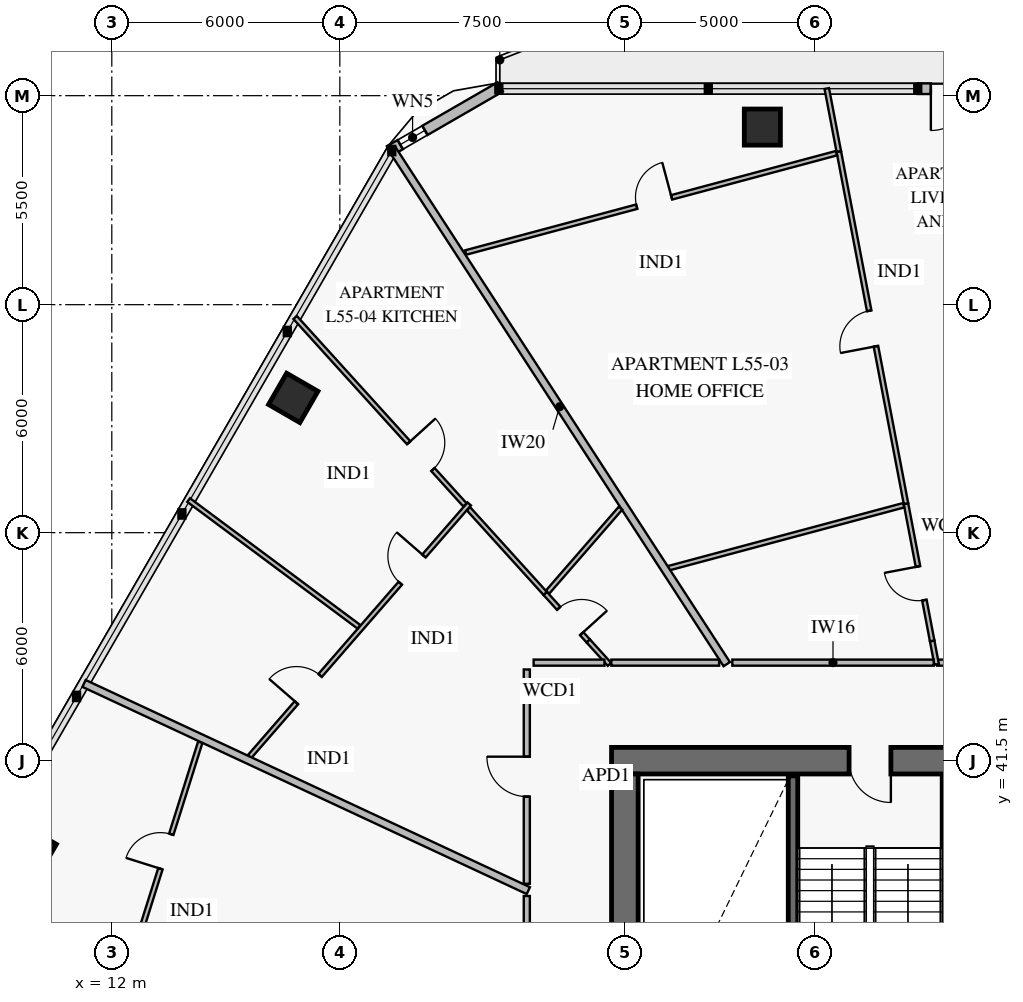
"""IFC4 building model, lengths in metres.
Left out: names, types, materials, properties, quantities, classifications, styles, units other than length and angle.
Written with IfcOpenShell. Run it as: python <this file> out.ifc"""

import sys

from ifc_helpers import new_model, si_unit, direction, frame, frame_2d, origin, origin_2d, place, context, subcontext, project, spatial, rectangle, extrude, element, fill, save


model = new_model("IFC4")
c1 = context("Model", 3, precision=1e-05, world=origin(), true_north=direction((0.0, 1.0)))
c2 = subcontext(c1, "Body", "Model", "MODEL_VIEW")
j1 = project(units=[si_unit("LENGTHUNIT", "METRE"), si_unit("PLANEANGLEUNIT", "RADIAN")], contexts=[c1])
p1 = place(None, origin())
s1 = spatial("IfcSite", under=j1, at=p1, CompositionType="ELEMENT")
p2 = place(p1, origin())
s2 = spatial("IfcBuilding", under=s1, at=p2, CompositionType="ELEMENT")
p3 = place(p2, frame((0.0, 0.0, 218.8)))
s3 = spatial("IfcBuildingStorey", under=s2, at=p3, CompositionType="ELEMENT", Elevation=218.8)
p4 = place(p3, frame((36.75, 41.5, 0.0), z_axis=(0.0, 0.0, 1.0), x_axis=(-1.0, 0.0, 0.0)))
e1 = element("IfcWall", 1, at=p4, inside=s3, PredefinedType="SHEAR", context=c2, shape_type="SweptSolid", body=[
    extrude(rectangle(XDim=11.6, YDim=0.7, at=frame_2d((5.8, 0.0))), origin(), (0.0, 0.0, 1.0), 3.8),
])
p5 = place(p4, frame((4.25, 0.0, 0.0)))
e2 = element("IfcOpeningElement", 2, at=p5, cuts=e1, PredefinedType="OPENING", context=c2, shape_type="SweptSolid", body=[
    extrude(rectangle(XDim=1.1, YDim=2.15, at=frame_2d((0.55, 1.075))), frame((0.0, 0.362, 0.0), z_axis=(0.0, -1.0, 0.0), x_axis=(1.0, 0.0, 0.0)), (0.0, 0.0, 1.0), 0.724),
])
p6 = place(p3, frame((25.5, 22.85, 0.0), z_axis=(0.0, 0.0, 1.0), x_axis=(0.0, 1.0, 0.0)))
e3 = element("IfcWall", 3, at=p6, inside=s3, PredefinedType="SHEAR", context=c2, shape_type="SweptSolid", body=[
    extrude(rectangle(XDim=18.3, YDim=0.7, at=frame_2d((9.15, 0.0))), origin(), (0.0, 0.0, 1.0), 3.8),
])
p7 = place(p6, frame((8.9, 0.0, 0.0)))
e4 = element("IfcOpeningElement", 4, at=p7, cuts=e3, PredefinedType="OPENING", context=c2, shape_type="SweptSolid", body=[
    extrude(rectangle(XDim=1.1, YDim=2.15, at=frame_2d((0.55, 1.075))), frame((0.0, 0.362, 0.0), z_axis=(0.0, -1.0, 0.0), x_axis=(1.0, 0.0, 0.0)), (0.0, 0.0, 1.0), 0.724),
])
for number, where, z_axis, x_axis in (
    (5, (29.118, 58.173, 0.0), (0.0, 0.0, 1.0), (-1.0, 0.0, 0.0)),
    (6, (16.774, 51.047, 0.0), (0.0, 0.0, 1.0), (-0.5, -0.866, 0.0)),
    (7, (9.892, 39.126, 0.0), (0.0, 0.0, 1.0), (-0.5, -0.866, 0.0)),
):
    element("IfcColumn", number, at=place(p3, frame(where, z_axis=z_axis, x_axis=x_axis)), inside=s3, PredefinedType="COLUMN", context=c2, shape_type="SweptSolid", body=[
        extrude(rectangle(XDim=0.95, YDim=0.95, at=origin_2d()), origin(), (0.0, 0.0, 1.0), 3.55),
    ])
p8 = place(p3, frame((19.307, 57.548, 0.0), z_axis=(0.0, 0.0, 1.0), x_axis=(0.866020068361, 0.500009241111, 0.0)))
e8 = element("IfcWall", 8, at=p8, inside=s3, PredefinedType="SOLIDWALL", context=c2, shape_type="SweptSolid", body=[
    extrude(rectangle(XDim=3.365, YDim=0.28, at=frame_2d((1.683, 0.0))), origin(), (0.0, 0.0, 1.0), 3.55),
])
p9 = place(p8, frame((0.326, 0.0, 0.85)))
e9 = element("IfcOpeningElement", 9, at=p9, cuts=e8, PredefinedType="OPENING", context=c2, shape_type="SweptSolid", body=[
    extrude(rectangle(XDim=0.75, YDim=1.5, at=frame_2d((0.375, 0.75))), frame((0.0, 0.152, 0.0), z_axis=(0.0, -1.0, 0.0), x_axis=(1.0, 0.0, 0.0)), (0.0, 0.0, 1.0), 0.304),
])
p10 = place(p3, frame((33.207, 59.183, 0.0), z_axis=(0.0, 0.0, 1.0), x_axis=(1.0, 0.0, 0.0)))
e10 = element("IfcWall", 10, at=p10, inside=s3, PredefinedType="SOLIDWALL", context=c2, shape_type="SweptSolid", body=[
    extrude(rectangle(XDim=1.79, YDim=0.28, at=frame_2d((0.895, 0.0))), origin(), (0.0, 0.0, 1.0), 3.55),
])
p11 = place(p10, frame((0.345, 0.0, 0.0)))
e11 = element("IfcOpeningElement", 11, at=p11, cuts=e10, PredefinedType="OPENING", context=c2, shape_type="SweptSolid", body=[
    extrude(rectangle(XDim=1.1, YDim=2.2, at=frame_2d((0.55, 1.1))), frame((0.0, 0.152, 0.0), z_axis=(0.0, -1.0, 0.0), x_axis=(1.0, 0.0, 0.0)), (0.0, 0.0, 1.0), 0.304),
])
for number, where, z_axis, x_axis in (
    (12, (29.925, 31.4, 0.0), (0.0, 0.0, 1.0), (0.0, 1.0, 0.0)),
    (13, (33.975, 31.4, 0.0), (0.0, 0.0, 1.0), (0.0, 1.0, 0.0)),
):
    element("IfcWall", number, at=place(p3, frame(where, z_axis=z_axis, x_axis=x_axis)), inside=s3, PredefinedType="SOLIDWALL", context=c2, shape_type="SweptSolid", body=[
        extrude(rectangle(XDim=9.7, YDim=0.25, at=frame_2d((4.85, 0.0))), origin(), (0.0, 0.0, 1.0), 3.8),
    ])
p12 = place(p3, frame((33.587, 44.65, 0.0), z_axis=(0.0, 0.0, 1.0), x_axis=(-0.187380416109, 0.982287422122, 0.0)))
e14 = element("IfcWall", 14, at=p12, inside=s3, PredefinedType="PARTITIONING", context=c2, shape_type="SweptSolid", body=[
    extrude(rectangle(XDim=3.679, YDim=0.12, at=frame_2d((1.84, 0.0))), origin(), (0.0, 0.0, 1.0), 3.55),
])
p13 = place(p12, frame((1.095, 0.0, 0.0)))
e15 = element("IfcOpeningElement", 15, at=p13, cuts=e14, PredefinedType="OPENING", context=c2, shape_type="SweptSolid", body=[
    extrude(rectangle(XDim=0.9, YDim=2.1, at=frame_2d((0.45, 1.05))), frame((0.0, 0.072, 0.0), z_axis=(0.0, -1.0, 0.0), x_axis=(1.0, 0.0, 0.0)), (0.0, 0.0, 1.0), 0.144),
])
p14 = place(p3, frame((32.897, 48.264, 0.0), z_axis=(0.0, 0.0, 1.0), x_axis=(-0.187382109983, 0.982287098998, 0.0)))
e16 = element("IfcWall", 16, at=p14, inside=s3, PredefinedType="PARTITIONING", context=c2, shape_type="SweptSolid", body=[
    extrude(rectangle(XDim=9.432, YDim=0.12, at=frame_2d((4.716, 0.0))), origin(), (0.0, 0.0, 1.0), 3.15),
])
p15 = place(p14, frame((4.216, 0.0, 0.0)))
e17 = element("IfcOpeningElement", 17, at=p15, cuts=e16, PredefinedType="OPENING", context=c2, shape_type="SweptSolid", body=[
    extrude(rectangle(XDim=0.95, YDim=2.1, at=frame_2d((0.475, 1.05))), frame((0.0, 0.072, 0.0), z_axis=(0.0, -1.0, 0.0), x_axis=(1.0, 0.0, 0.0)), (0.0, 0.0, 1.0), 0.144),
])
p16 = place(p3, frame((31.069, 57.487, 0.0), z_axis=(0.0, 0.0, 1.0), x_axis=(-0.965920975917, -0.258837146257, 0.0)))
e18 = element("IfcWall", 18, at=p16, inside=s3, PredefinedType="PARTITIONING", context=c2, shape_type="SweptSolid", body=[
    extrude(rectangle(XDim=10.103, YDim=0.12, at=frame_2d((5.051, 0.0))), origin(), (0.0, 0.0, 1.0), 2.87),
])
p17 = place(p16, frame((4.492, 0.0, 0.0)))
e19 = element("IfcOpeningElement", 19, at=p17, cuts=e18, PredefinedType="OPENING", context=c2, shape_type="SweptSolid", body=[
    extrude(rectangle(XDim=0.95, YDim=2.1, at=frame_2d((0.475, 1.05))), frame((0.0, 0.072, 0.0), z_axis=(0.0, -1.0, 0.0), x_axis=(1.0, 0.0, 0.0)), (0.0, 0.0, 1.0), 0.144),
])
p18 = place(p3, frame((36.507, 44.08, 0.0), z_axis=(0.0, 0.0, 1.0), x_axis=(-1.0, 0.0, 0.0)))
e20 = element("IfcWall", 20, at=p18, inside=s3, PredefinedType="PARTITIONING", context=c2, shape_type="SweptSolid", body=[
    extrude(rectangle(XDim=2.791, YDim=0.16, at=frame_2d((1.396, 0.0))), origin(), (0.0, 0.0, 1.0), 3.55),
])
p19 = place(p18, frame((0.871, 0.0, 0.0)))
e21 = element("IfcOpeningElement", 21, at=p19, cuts=e20, PredefinedType="OPENING", context=c2, shape_type="SweptSolid", body=[
    extrude(rectangle(XDim=1.05, YDim=2.15, at=frame_2d((0.525, 1.075))), frame((0.0, 0.092, 0.0), z_axis=(0.0, -1.0, 0.0), x_axis=(1.0, 0.0, 0.0)), (0.0, 0.0, 1.0), 0.184),
])
p20 = place(p3, frame((21.405, 48.256, 0.0), z_axis=(0.0, 0.0, 1.0), x_axis=(-0.656056582119, -0.754711707249, 0.0)))
e22 = element("IfcWall", 22, at=p20, inside=s3, PredefinedType="PARTITIONING", context=c2, shape_type="SweptSolid", body=[
    extrude(rectangle(XDim=8.81, YDim=0.12, at=frame_2d((4.405, 0.0))), origin(), (0.0, 0.0, 1.0), 2.9),
])
p21 = place(p20, frame((1.815, 0.0, 0.0)))
e23 = element("IfcOpeningElement", 23, at=p21, cuts=e22, PredefinedType="OPENING", context=c2, shape_type="SweptSolid", body=[
    extrude(rectangle(XDim=0.95, YDim=2.1, at=frame_2d((0.475, 1.05))), frame((0.0, 0.072, 0.0), z_axis=(0.0, -1.0, 0.0), x_axis=(1.0, 0.0, 0.0)), (0.0, 0.0, 1.0), 0.144),
])
p22 = place(p20, frame((5.979, 0.0, 0.0)))
e24 = element("IfcOpeningElement", 24, at=p22, cuts=e22, PredefinedType="OPENING", context=c2, shape_type="SweptSolid", body=[
    extrude(rectangle(XDim=0.95, YDim=2.1, at=frame_2d((0.475, 1.05))), frame((0.0, 0.072, 0.0), z_axis=(0.0, -1.0, 0.0), x_axis=(1.0, 0.0, 0.0)), (0.0, 0.0, 1.0), 0.144),
])
p23 = place(p3, frame((24.538, 44.65, 0.0), z_axis=(0.0, 0.0, 1.0), x_axis=(-0.671412772052, 0.741083591456, 0.0)))
e25 = element("IfcWall", 25, at=p23, inside=s3, PredefinedType="PARTITIONING", context=c2, shape_type="SweptSolid", body=[
    extrude(rectangle(XDim=1.689, YDim=0.12, at=frame_2d((0.844, 0.0))), origin(), (0.0, 0.0, 1.0), 3.55),
])
p24 = place(p23, frame((0.26, 0.0, 0.0)))
e26 = element("IfcOpeningElement", 26, at=p24, cuts=e25, PredefinedType="OPENING", context=c2, shape_type="SweptSolid", body=[
    extrude(rectangle(XDim=0.9, YDim=2.1, at=frame_2d((0.45, 1.05))), frame((0.0, 0.072, 0.0), z_axis=(0.0, -1.0, 0.0), x_axis=(1.0, 0.0, 0.0)), (0.0, 0.0, 1.0), 0.144),
])
p25 = place(p3, frame((23.404, 45.902, 0.0), z_axis=(0.0, 0.0, 1.0), x_axis=(-0.671451143828, 0.741048825282, 0.0)))
e27 = element("IfcWall", 27, at=p25, inside=s3, PredefinedType="PARTITIONING", context=c2, shape_type="SweptSolid", body=[
    extrude(rectangle(XDim=3.006, YDim=0.12, at=frame_2d((1.503, 0.0))), origin(), (0.0, 0.0, 1.0), 3.55),
])
p26 = place(p3, frame((21.293, 48.231, 0.0), z_axis=(0.0, 0.0, 1.0), x_axis=(-0.671455850546, 0.741044560581, 0.0)))
e28 = element("IfcWall", 28, at=p26, inside=s3, PredefinedType="PARTITIONING", context=c2, shape_type="SweptSolid", body=[
    extrude(rectangle(XDim=6.655, YDim=0.12, at=frame_2d((3.328, 0.0))), origin(), (0.0, 0.0, 1.0), 2.87),
])
p27 = place(p26, frame((1.256, 0.0, 0.0)))
e29 = element("IfcOpeningElement", 29, at=p27, cuts=e28, PredefinedType="OPENING", context=c2, shape_type="SweptSolid", body=[
    extrude(rectangle(XDim=0.95, YDim=2.1, at=frame_2d((0.475, 1.05))), frame((0.0, 0.072, 0.0), z_axis=(0.0, -1.0, 0.0), x_axis=(1.0, 0.0, 0.0)), (0.0, 0.0, 1.0), 0.144),
])
p28 = place(p3, frame((22.92, 43.9, 0.0), z_axis=(0.0, 0.0, 1.0), x_axis=(0.0, -1.0, 0.0)))
e30 = element("IfcWall", 30, at=p28, inside=s3, PredefinedType="PARTITIONING", context=c2, shape_type="SweptSolid", body=[
    extrude(rectangle(XDim=5.639, YDim=0.16, at=frame_2d((2.819, 0.0))), origin(), (0.0, 0.0, 1.0), 3.55),
])
p29 = place(p28, frame((2.294, 0.0, 0.0)))
e31 = element("IfcOpeningElement", 31, at=p29, cuts=e30, PredefinedType="OPENING", context=c2, shape_type="SweptSolid", body=[
    extrude(rectangle(XDim=1.05, YDim=2.15, at=frame_2d((0.525, 1.075))), frame((0.0, 0.092, 0.0), z_axis=(0.0, -1.0, 0.0), x_axis=(1.0, 0.0, 0.0)), (0.0, 0.0, 1.0), 0.184),
])
p30 = place(p3, frame((14.328, 41.986, 0.0), z_axis=(0.0, 0.0, 1.0), x_axis=(-0.300371813261, -0.95382219192, 0.0)))
e32 = element("IfcWall", 32, at=p30, inside=s3, PredefinedType="PARTITIONING", context=c2, shape_type="SweptSolid", body=[
    extrude(rectangle(XDim=6.031, YDim=0.12, at=frame_2d((3.016, 0.0))), origin(), (0.0, 0.0, 1.0), 2.9),
])
p31 = place(p30, frame((2.541, 0.0, 0.0)))
e33 = element("IfcOpeningElement", 33, at=p31, cuts=e32, PredefinedType="OPENING", context=c2, shape_type="SweptSolid", body=[
    extrude(rectangle(XDim=0.95, YDim=2.1, at=frame_2d((0.475, 1.05))), frame((0.0, 0.072, 0.0), z_axis=(0.0, -1.0, 0.0), x_axis=(1.0, 0.0, 0.0)), (0.0, 0.0, 1.0), 0.144),
])
p32 = place(p3, frame((22.92, 37.939, 0.0), z_axis=(0.0, 0.0, 1.0), x_axis=(0.0, -1.0, 0.0)))
e34 = element("IfcWall", 34, at=p32, inside=s3, PredefinedType="PARTITIONING", context=c2, shape_type="SweptSolid", body=[
    extrude(rectangle(XDim=3.504, YDim=0.16, at=frame_2d((1.752, 0.0))), origin(), (0.0, 0.0, 1.0), 2.9),
])
p33 = place(p32, frame((1.227, 0.0, 0.0)))
e35 = element("IfcOpeningElement", 35, at=p33, cuts=e34, PredefinedType="OPENING", context=c2, shape_type="SweptSolid", body=[
    extrude(rectangle(XDim=1.05, YDim=2.15, at=frame_2d((0.525, 1.075))), frame((0.0, 0.092, 0.0), z_axis=(0.0, -1.0, 0.0), x_axis=(1.0, 0.0, 0.0)), (0.0, 0.0, 1.0), 0.184),
])
p34 = place(p3, frame((33.704, 44.035, 0.0), z_axis=(0.0, 0.0, 1.0), x_axis=(-0.187327304351, 0.982297552193, 0.0)))
e36 = element("IfcWall", 36, at=p34, inside=s3, PredefinedType="PARTITIONING", context=c2, shape_type="SweptSolid", body=[
    extrude(rectangle(XDim=0.625, YDim=0.12, at=frame_2d((0.313, 0.0))), origin(), (0.0, 0.0, 1.0), 3.55),
])
p35 = place(p3, frame((31.13, 57.529, 0.0), z_axis=(0.0, 0.0, 1.0), x_axis=(-0.187324644642, 0.982298059404, 0.0)))
e37 = element("IfcWall", 37, at=p35, inside=s3, PredefinedType="PARTITIONING", context=c2, shape_type="SweptSolid", body=[
    extrude(rectangle(XDim=1.689, YDim=0.12, at=frame_2d((0.844, 0.0))), origin(), (0.0, 0.0, 1.0), 2.87),
])
p36 = place(p3, frame((32.836, 48.222, 0.0), z_axis=(0.0, 0.0, 1.0), x_axis=(-0.96593063868, -0.258801084347, 0.0)))
e38 = element("IfcWall", 38, at=p36, inside=s3, PredefinedType="PARTITIONING", context=c2, shape_type="SweptSolid", body=[
    extrude(rectangle(XDim=6.446, YDim=0.12, at=frame_2d((3.223, 0.0))), origin(), (0.0, 0.0, 1.0), 2.9),
])
p37 = place(p3, frame((28.181, 44.04, 0.0), z_axis=(0.0, 0.0, 1.0), x_axis=(-0.54463871909, 0.838670773109, 0.0)))
e39 = element("IfcWall", 39, at=p37, inside=s3, PredefinedType="PARTITIONING", context=c2, shape_type="SweptSolid", body=[
    extrude(rectangle(XDim=16.152, YDim=0.2, at=frame_2d((8.076, 0.0))), origin(), (0.0, 0.0, 1.0), 2.87),
])
p38 = place(p3, frame((18.504, 45.022, 0.0), z_axis=(0.0, 0.0, 1.0), x_axis=(-0.80220207226, 0.597052623528, 0.0)))
e40 = element("IfcWall", 40, at=p38, inside=s3, PredefinedType="PARTITIONING", context=c2, shape_type="SweptSolid", body=[
    extrude(rectangle(XDim=5.587, YDim=0.12, at=frame_2d((2.794, 0.0))), origin(), (0.0, 0.0, 1.0), 2.87),
])
p39 = place(p3, frame((25.095, 44.035, 0.0), z_axis=(0.0, 0.0, 1.0), x_axis=(-0.671544659746, 0.740964081428, 0.0)))
e41 = element("IfcWall", 41, at=p39, inside=s3, PredefinedType="PARTITIONING", context=c2, shape_type="SweptSolid", body=[
    extrude(rectangle(XDim=0.83, YDim=0.12, at=frame_2d((0.415, 0.0))), origin(), (0.0, 0.0, 1.0), 3.55),
])
p40 = place(p3, frame((25.387, 48.145, 0.0), z_axis=(0.0, 0.0, 1.0), x_axis=(-0.656075513179, -0.75469525042, 0.0)))
e42 = element("IfcWall", 42, at=p40, inside=s3, PredefinedType="PARTITIONING", context=c2, shape_type="SweptSolid", body=[
    extrude(rectangle(XDim=2.929, YDim=0.12, at=frame_2d((1.464, 0.0))), origin(), (0.0, 0.0, 1.0), 3.55),
])
p41 = place(p3, frame((22.96, 38.081, 0.0), z_axis=(0.0, 0.0, 1.0), x_axis=(-0.906312686975, 0.422607753629, 0.0)))
e43 = element("IfcWall", 43, at=p41, inside=s3, PredefinedType="PARTITIONING", context=c2, shape_type="SweptSolid", body=[
    extrude(rectangle(XDim=12.899, YDim=0.2, at=frame_2d((6.449, 0.0))), origin(), (0.0, 0.0, 1.0), 2.87),
])
p42 = place(p3, frame((12.479, 36.342, 0.0), z_axis=(0.0, 0.0, 1.0), x_axis=(-0.983384489308, 0.181534972355, 0.0)))
e44 = element("IfcWall", 44, at=p42, inside=s3, PredefinedType="PARTITIONING", context=c2, shape_type="SweptSolid", body=[
    extrude(rectangle(XDim=4.937, YDim=0.12, at=frame_2d((2.469, 0.0))), origin(), (0.0, 0.0, 1.0), 2.87),
])
p43 = place(p3, frame((33.626, 44.08, 0.0), z_axis=(0.0, 0.0, 1.0), x_axis=(-1.0, 0.0, 0.0)))
e45 = element("IfcWall", 45, at=p43, inside=s3, PredefinedType="PARTITIONING", context=c2, shape_type="SweptSolid", body=[
    extrude(rectangle(XDim=5.299, YDim=0.16, at=frame_2d((2.649, 0.0))), origin(), (0.0, 0.0, 1.0), 2.9),
])
p44 = place(p3, frame((24.962, 44.08, 0.0), z_axis=(0.0, 0.0, 1.0), x_axis=(-1.0, 0.0, 0.0)))
e46 = element("IfcWall", 46, at=p44, inside=s3, PredefinedType="PARTITIONING", context=c2, shape_type="SweptSolid", body=[
    extrude(rectangle(XDim=1.862, YDim=0.16, at=frame_2d((0.931, 0.0))), origin(), (0.0, 0.0, 1.0), 2.9),
])
p45 = place(p3, frame((27.98, 44.08, 0.0), z_axis=(0.0, 0.0, 1.0), x_axis=(-1.0, 0.0, 0.0)))
e47 = element("IfcWall", 47, at=p45, inside=s3, PredefinedType="PARTITIONING", context=c2, shape_type="SweptSolid", body=[
    extrude(rectangle(XDim=2.836, YDim=0.16, at=frame_2d((1.418, 0.0))), origin(), (0.0, 0.0, 1.0), 3.55),
])
p46 = place(p9, origin())
e48 = element("IfcWindow", 48, at=p46, inside=s3, PartitioningType="SINGLE_PANEL", PredefinedType="WINDOW", context=c2, shape_type="SweptSolid", body=[
    extrude(rectangle(XDim=0.75, YDim=1.5, at=frame_2d((0.375, 0.75))), frame((0.0, 0.03, 0.0), z_axis=(0.0, -1.0, 0.0), x_axis=(1.0, 0.0, 0.0)), (0.0, 0.0, 1.0), 0.06),
])
fill(e9, e48)
p47 = place(p11, frame((1.1, 0.0, 0.0), z_axis=(0.0, 0.0, 1.0), x_axis=(-1.0, 0.0, 0.0)))
e49 = element("IfcDoor", 49, at=p47, inside=s3, OperationType="SINGLE_SWING_RIGHT", PredefinedType="DOOR", context=c2, shape_type="SweptSolid", body=[
    extrude(rectangle(XDim=1.1, YDim=2.2, at=frame_2d((0.55, 1.1))), frame((0.0, 0.025, 0.0), z_axis=(0.0, -1.0, 0.0), x_axis=(1.0, 0.0, 0.0)), (0.0, 0.0, 1.0), 0.05),
])
fill(e11, e49)
p48 = place(p5, origin())
e50 = element("IfcDoor", 50, at=p48, inside=s3, OperationType="SINGLE_SWING_LEFT", PredefinedType="USERDEFINED", context=c2, shape_type="SweptSolid", body=[
    extrude(rectangle(XDim=1.1, YDim=2.15, at=frame_2d((0.55, 1.075))), frame((0.0, 0.025, 0.0), z_axis=(0.0, -1.0, 0.0), x_axis=(1.0, 0.0, 0.0)), (0.0, 0.0, 1.0), 0.05),
])
fill(e2, e50)
p49 = place(p13, origin())
e51 = element("IfcDoor", 51, at=p49, inside=s3, OperationType="SINGLE_SWING_RIGHT", PredefinedType="DOOR", context=c2, shape_type="SweptSolid", body=[
    extrude(rectangle(XDim=0.9, YDim=2.1, at=frame_2d((0.45, 1.05))), frame((0.0, 0.025, 0.0), z_axis=(0.0, -1.0, 0.0), x_axis=(1.0, 0.0, 0.0)), (0.0, 0.0, 1.0), 0.05),
])
fill(e15, e51)
p50 = place(p15, origin())
e52 = element("IfcDoor", 52, at=p50, inside=s3, OperationType="SINGLE_SWING_LEFT", PredefinedType="DOOR", context=c2, shape_type="SweptSolid", body=[
    extrude(rectangle(XDim=0.95, YDim=2.1, at=frame_2d((0.475, 1.05))), frame((0.0, 0.025, 0.0), z_axis=(0.0, -1.0, 0.0), x_axis=(1.0, 0.0, 0.0)), (0.0, 0.0, 1.0), 0.05),
])
fill(e17, e52)
p51 = place(p17, frame((0.95, 0.0, 0.0), z_axis=(0.0, 0.0, 1.0), x_axis=(-1.0, 0.0, 0.0)))
e53 = element("IfcDoor", 53, at=p51, inside=s3, OperationType="SINGLE_SWING_RIGHT", PredefinedType="DOOR", context=c2, shape_type="SweptSolid", body=[
    extrude(rectangle(XDim=0.95, YDim=2.1, at=frame_2d((0.475, 1.05))), frame((0.0, 0.025, 0.0), z_axis=(0.0, -1.0, 0.0), x_axis=(1.0, 0.0, 0.0)), (0.0, 0.0, 1.0), 0.05),
])
fill(e19, e53)
p52 = place(p21, frame((0.95, 0.0, 0.0), z_axis=(0.0, 0.0, 1.0), x_axis=(-1.0, 0.0, 0.0)))
e54 = element("IfcDoor", 54, at=p52, inside=s3, OperationType="SINGLE_SWING_RIGHT", PredefinedType="DOOR", context=c2, shape_type="SweptSolid", body=[
    extrude(rectangle(XDim=0.95, YDim=2.1, at=frame_2d((0.475, 1.05))), frame((0.0, 0.025, 0.0), z_axis=(0.0, -1.0, 0.0), x_axis=(1.0, 0.0, 0.0)), (0.0, 0.0, 1.0), 0.05),
])
fill(e23, e54)
p53 = place(p22, frame((0.95, 0.0, 0.0), z_axis=(0.0, 0.0, 1.0), x_axis=(-1.0, 0.0, 0.0)))
e55 = element("IfcDoor", 55, at=p53, inside=s3, OperationType="SINGLE_SWING_LEFT", PredefinedType="DOOR", context=c2, shape_type="SweptSolid", body=[
    extrude(rectangle(XDim=0.95, YDim=2.1, at=frame_2d((0.475, 1.05))), frame((0.0, 0.025, 0.0), z_axis=(0.0, -1.0, 0.0), x_axis=(1.0, 0.0, 0.0)), (0.0, 0.0, 1.0), 0.05),
])
fill(e24, e55)
p54 = place(p24, frame((0.9, 0.0, 0.0), z_axis=(0.0, 0.0, 1.0), x_axis=(-1.0, 0.0, 0.0)))
e56 = element("IfcDoor", 56, at=p54, inside=s3, OperationType="SINGLE_SWING_RIGHT", PredefinedType="DOOR", context=c2, shape_type="SweptSolid", body=[
    extrude(rectangle(XDim=0.9, YDim=2.1, at=frame_2d((0.45, 1.05))), frame((0.0, 0.025, 0.0), z_axis=(0.0, -1.0, 0.0), x_axis=(1.0, 0.0, 0.0)), (0.0, 0.0, 1.0), 0.05),
])
fill(e26, e56)
p55 = place(p27, frame((0.95, 0.0, 0.0), z_axis=(0.0, 0.0, 1.0), x_axis=(-1.0, 0.0, 0.0)))
e57 = element("IfcDoor", 57, at=p55, inside=s3, OperationType="SINGLE_SWING_LEFT", PredefinedType="DOOR", context=c2, shape_type="SweptSolid", body=[
    extrude(rectangle(XDim=0.95, YDim=2.1, at=frame_2d((0.475, 1.05))), frame((0.0, 0.025, 0.0), z_axis=(0.0, -1.0, 0.0), x_axis=(1.0, 0.0, 0.0)), (0.0, 0.0, 1.0), 0.05),
])
fill(e29, e57)
p56 = place(p29, frame((1.05, 0.0, 0.0), z_axis=(0.0, 0.0, 1.0), x_axis=(-1.0, 0.0, 0.0)))
e58 = element("IfcDoor", 58, at=p56, inside=s3, OperationType="SINGLE_SWING_RIGHT", PredefinedType="DOOR", context=c2, shape_type="SweptSolid", body=[
    extrude(rectangle(XDim=1.05, YDim=2.15, at=frame_2d((0.525, 1.075))), frame((0.0, 0.025, 0.0), z_axis=(0.0, -1.0, 0.0), x_axis=(1.0, 0.0, 0.0)), (0.0, 0.0, 1.0), 0.05),
])
fill(e31, e58)
p57 = place(p31, frame((0.95, 0.0, 0.0), z_axis=(0.0, 0.0, 1.0), x_axis=(-1.0, 0.0, 0.0)))
e59 = element("IfcDoor", 59, at=p57, inside=s3, OperationType="SINGLE_SWING_LEFT", PredefinedType="DOOR", context=c2, shape_type="SweptSolid", body=[
    extrude(rectangle(XDim=0.95, YDim=2.1, at=frame_2d((0.475, 1.05))), frame((0.0, 0.025, 0.0), z_axis=(0.0, -1.0, 0.0), x_axis=(1.0, 0.0, 0.0)), (0.0, 0.0, 1.0), 0.05),
])
fill(e33, e59)
save(model, sys.argv[1])
